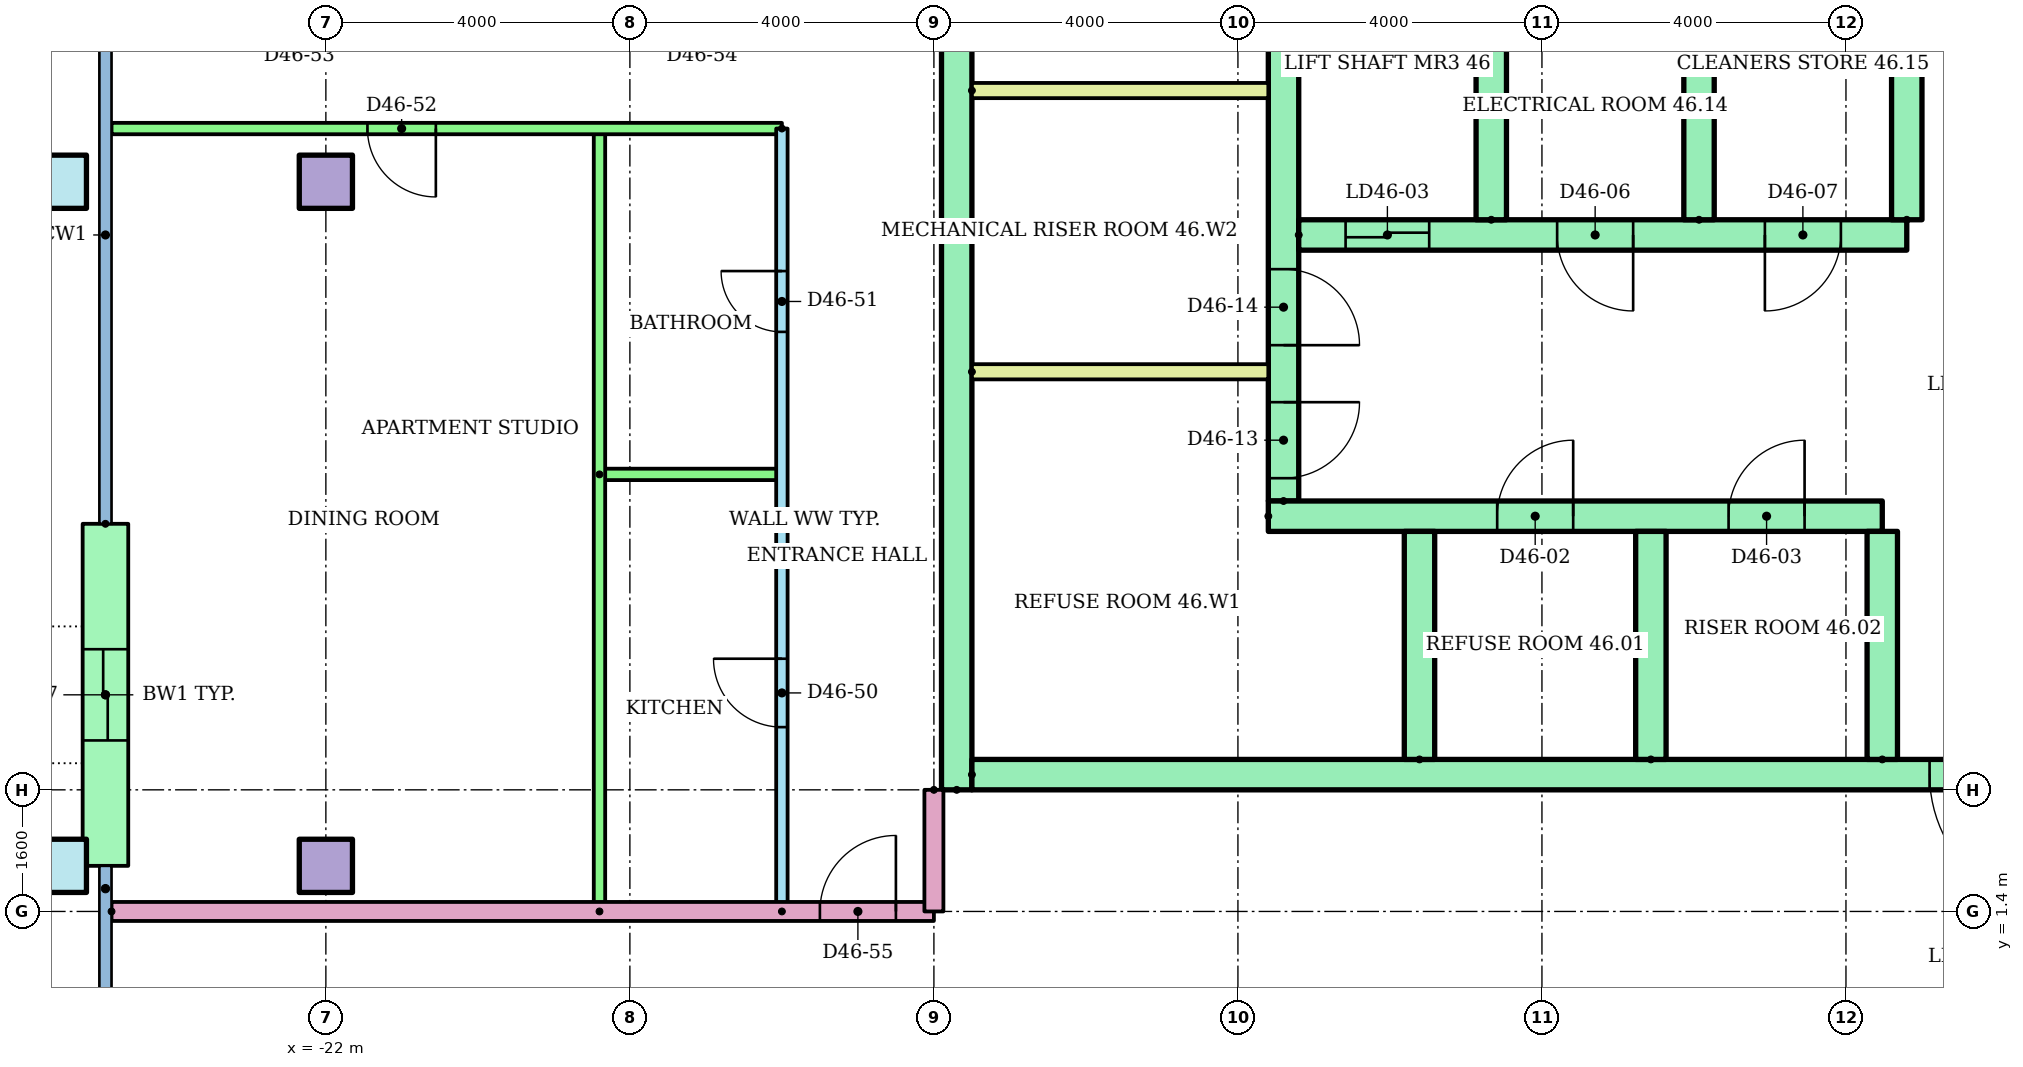
"""IFC4 building model, lengths in metres.
Left out: names, types, materials, properties, quantities, classifications, styles, units other than length and angle.
Written with IfcOpenShell. Run it as: python <this file> out.ifc"""

import sys

from ifc_helpers import new_model, si_unit, direction, frame, frame_2d, origin, origin_2d, place, context, subcontext, project, spatial, rectangle, hollow_rectangle, extrude, element, fill, save


model = new_model("IFC4")
c1 = context("Model", 3, precision=1e-05, world=origin(), true_north=direction((0.0, 1.0)))
c2 = subcontext(c1, "Body", "Model", "MODEL_VIEW")
j1 = project(units=[si_unit("LENGTHUNIT", "METRE"), si_unit("PLANEANGLEUNIT", "RADIAN")], contexts=[c1])
p1 = place(None, origin())
s1 = spatial("IfcSite", under=j1, at=p1, CompositionType="ELEMENT")
p2 = place(p1, origin())
s2 = spatial("IfcBuilding", under=s1, at=p2, CompositionType="ELEMENT")
p3 = place(p2, frame((0.0, 0.0, 178.1)))
s3 = spatial("IfcBuildingStorey", under=s2, at=p3, CompositionType="ELEMENT", Elevation=178.1)
p4 = place(p3, frame((-25.5, 2.0, 0.0)))
e1 = element("IfcColumn", 1, at=p4, inside=s3, PredefinedType="COLUMN", context=c2, shape_type="SweptSolid", body=[
    extrude(hollow_rectangle(XDim=0.7, YDim=0.7, WallThickness=0.036, at=origin_2d()), origin(), (0.0, 0.0, 1.0), 3.2),
])
p5 = place(p3, frame((-22.0, 2.0, 0.0)))
e2 = element("IfcColumn", 2, at=p5, inside=s3, PredefinedType="COLUMN", context=c2, shape_type="SweptSolid", body=[
    extrude(rectangle(XDim=0.7, YDim=0.7, at=origin_2d()), origin(), (0.0, 0.0, 1.0), 3.2),
])
p6 = place(p3, frame((-25.5, 11.0, 0.0)))
e3 = element("IfcColumn", 3, at=p6, inside=s3, PredefinedType="COLUMN", context=c2, shape_type="SweptSolid", body=[
    extrude(hollow_rectangle(XDim=0.7, YDim=0.7, WallThickness=0.036, at=origin_2d()), origin(), (0.0, 0.0, 1.0), 3.2),
])
p7 = place(p3, frame((-22.0, 11.0, 0.0)))
e4 = element("IfcColumn", 4, at=p7, inside=s3, PredefinedType="COLUMN", context=c2, shape_type="SweptSolid", body=[
    extrude(rectangle(XDim=0.7, YDim=0.7, at=origin_2d()), origin(), (0.0, 0.0, 1.0), 3.2),
])
p8 = place(p3, frame((-24.9, 6.5, 0.0), z_axis=(0.0, 0.0, 1.0), x_axis=(0.0, -1.0, 0.0)))
e5 = element("IfcWall", 5, at=p8, inside=s3, PredefinedType="STANDARD", context=c2, shape_type="SweptSolid", body=[
    extrude(rectangle(XDim=4.5, YDim=0.6, at=frame_2d((2.25, 0.0))), origin(), (0.0, 0.0, 1.0), 2.92),
])
p9 = place(p8, frame((1.65, 0.0, 0.0)))
e6 = element("IfcOpeningElement", 6, at=p9, cuts=e5, PredefinedType="OPENING", context=c2, shape_type="SweptSolid", body=[
    extrude(rectangle(XDim=1.2, YDim=2.1, at=frame_2d((0.6, 1.05))), frame((0.0, 0.31, 0.0), z_axis=(0.0, -1.0, 0.0), x_axis=(1.0, 0.0, 0.0)), (0.0, 0.0, 1.0), 0.62),
])
p10 = place(p3, frame((-13.7, 3.0, 0.0), z_axis=(0.0, 0.0, 1.0), x_axis=(0.0, 1.0, 0.0)))
e7 = element("IfcWall", 7, at=p10, inside=s3, PredefinedType="SHEAR", context=c2, shape_type="SweptSolid", body=[
    extrude(rectangle(XDim=17.0, YDim=0.4, at=frame_2d((8.5, 0.0))), origin(), (0.0, 0.0, 1.0), 2.92),
])
p11 = place(p3, frame((-9.4, 6.8, 0.0), z_axis=(0.0, 0.0, 1.0), x_axis=(0.0, 1.0, 0.0)))
e8 = element("IfcWall", 8, at=p11, inside=s3, PredefinedType="SHEAR", context=c2, shape_type="SweptSolid", body=[
    extrude(rectangle(XDim=12.7, YDim=0.4, at=frame_2d((6.35, 0.0))), origin(), (0.0, 0.0, 1.0), 2.92),
])
p12 = place(p11, frame((0.3, 0.0, 0.0)))
e9 = element("IfcOpeningElement", 9, at=p12, cuts=e8, PredefinedType="OPENING", context=c2, shape_type="SweptSolid", body=[
    extrude(rectangle(XDim=1.0, YDim=2.1, at=frame_2d((0.5, 1.05))), frame((0.0, 0.21, 0.0), z_axis=(0.0, -1.0, 0.0), x_axis=(1.0, 0.0, 0.0)), (0.0, 0.0, 1.0), 0.42),
])
p13 = place(p11, frame((2.05, 0.0, 0.0)))
e10 = element("IfcOpeningElement", 10, at=p13, cuts=e8, PredefinedType="OPENING", context=c2, shape_type="SweptSolid", body=[
    extrude(rectangle(XDim=1.0, YDim=2.1, at=frame_2d((0.5, 1.05))), frame((0.0, 0.21, 0.0), z_axis=(0.0, -1.0, 0.0), x_axis=(1.0, 0.0, 0.0)), (0.0, 0.0, 1.0), 0.42),
])
p14 = place(p11, frame((7.925, 0.0, 0.0)))
e11 = element("IfcOpeningElement", 11, at=p14, cuts=e8, PredefinedType="OPENING", context=c2, shape_type="SweptSolid", body=[
    extrude(rectangle(XDim=1.0, YDim=2.1, at=frame_2d((0.5, 1.05))), frame((0.0, 0.21, 0.0), z_axis=(0.0, -1.0, 0.0), x_axis=(1.0, 0.0, 0.0)), (0.0, 0.0, 1.0), 0.42),
])
p15 = place(p3, frame((-13.5, 3.2, 0.0)))
e12 = element("IfcWall", 12, at=p15, inside=s3, PredefinedType="SHEAR", context=c2, shape_type="SweptSolid", body=[
    extrude(rectangle(XDim=27.0, YDim=0.4, at=frame_2d((13.5, 0.0))), origin(), (0.0, 0.0, 1.0), 2.92),
])
p16 = place(p15, frame((22.083, 0.0, 0.0)))
e13 = element("IfcOpeningElement", 13, at=p16, cuts=e12, PredefinedType="OPENING", context=c2, shape_type="SweptSolid", body=[
    extrude(rectangle(XDim=1.1, YDim=2.1, at=frame_2d((0.55, 1.05))), frame((0.0, 0.21, 0.0), z_axis=(0.0, -1.0, 0.0), x_axis=(1.0, 0.0, 0.0)), (0.0, 0.0, 1.0), 0.42),
])
p17 = place(p15, frame((25.128, 0.0, 0.0)))
e14 = element("IfcOpeningElement", 14, at=p17, cuts=e12, PredefinedType="OPENING", context=c2, shape_type="SweptSolid", body=[
    extrude(rectangle(XDim=1.1, YDim=2.1, at=frame_2d((0.55, 1.05))), frame((0.0, 0.21, 0.0), z_axis=(0.0, -1.0, 0.0), x_axis=(1.0, 0.0, 0.0)), (0.0, 0.0, 1.0), 0.42),
])
p18 = place(p15, frame((12.6, 0.0, 0.0)))
e15 = element("IfcOpeningElement", 15, at=p18, cuts=e12, PredefinedType="OPENING", context=c2, shape_type="SweptSolid", body=[
    extrude(rectangle(XDim=1.8, YDim=2.1, at=frame_2d((0.9, 1.05))), frame((0.0, 0.21, 0.0), z_axis=(0.0, -1.0, 0.0), x_axis=(1.0, 0.0, 0.0)), (0.0, 0.0, 1.0), 0.42),
])
p19 = place(p3, frame((-9.6, 6.6, 0.0)))
e16 = element("IfcWall", 16, at=p19, inside=s3, PredefinedType="SHEAR", context=c2, shape_type="SweptSolid", body=[
    extrude(rectangle(XDim=8.078, YDim=0.4, at=frame_2d((4.039, 0.0))), origin(), (0.0, 0.0, 1.0), 2.92),
])
p20 = place(p19, frame((3.011, 0.0, 0.0)))
e17 = element("IfcOpeningElement", 17, at=p20, cuts=e16, PredefinedType="OPENING", context=c2, shape_type="SweptSolid", body=[
    extrude(rectangle(XDim=1.0, YDim=2.1, at=frame_2d((0.5, 1.05))), frame((0.0, 0.21, 0.0), z_axis=(0.0, -1.0, 0.0), x_axis=(1.0, 0.0, 0.0)), (0.0, 0.0, 1.0), 0.42),
])
p21 = place(p19, frame((6.056, 0.0, 0.0)))
e18 = element("IfcOpeningElement", 18, at=p21, cuts=e16, PredefinedType="OPENING", context=c2, shape_type="SweptSolid", body=[
    extrude(rectangle(XDim=1.0, YDim=2.1, at=frame_2d((0.5, 1.05))), frame((0.0, 0.21, 0.0), z_axis=(0.0, -1.0, 0.0), x_axis=(1.0, 0.0, 0.0)), (0.0, 0.0, 1.0), 0.42),
])
for number, where, z_axis, x_axis in (
    (19, (-7.611, 3.4, 0.0), (0.0, 0.0, 1.0), (0.0, 1.0, 0.0)),
    (20, (-4.567, 3.4, 0.0), (0.0, 0.0, 1.0), (0.0, 1.0, 0.0)),
    (21, (-1.522, 3.4, 0.0), (0.0, 0.0, 1.0), (0.0, 1.0, 0.0)),
):
    element("IfcWall", number, at=place(p3, frame(where, z_axis=z_axis, x_axis=x_axis)), inside=s3, PredefinedType="SHEAR", context=c2, shape_type="SweptSolid", body=[
        extrude(rectangle(XDim=3.0, YDim=0.4, at=frame_2d((1.5, 0.0))), origin(), (0.0, 0.0, 1.0), 2.92),
    ])
p22 = place(p3, frame((-9.2, 10.3, 0.0)))
e22 = element("IfcWall", 22, at=p22, inside=s3, PredefinedType="SHEAR", context=c2, shape_type="SweptSolid", body=[
    extrude(rectangle(XDim=8.0, YDim=0.4, at=frame_2d((4.0, 0.0))), origin(), (0.0, 0.0, 1.0), 2.92),
])
p23 = place(p22, frame((0.617, 0.0, 0.0)))
e23 = element("IfcOpeningElement", 23, at=p23, cuts=e22, PredefinedType="OPENING", context=c2, shape_type="SweptSolid", body=[
    extrude(rectangle(XDim=1.1, YDim=2.1, at=frame_2d((0.55, 1.05))), frame((0.0, 0.21, 0.0), z_axis=(0.0, -1.0, 0.0), x_axis=(1.0, 0.0, 0.0)), (0.0, 0.0, 1.0), 0.42),
])
p24 = place(p22, frame((3.4, 0.0, 0.0)))
e24 = element("IfcOpeningElement", 24, at=p24, cuts=e22, PredefinedType="OPENING", context=c2, shape_type="SweptSolid", body=[
    extrude(rectangle(XDim=1.0, YDim=2.1, at=frame_2d((0.5, 1.05))), frame((0.0, 0.21, 0.0), z_axis=(0.0, -1.0, 0.0), x_axis=(1.0, 0.0, 0.0)), (0.0, 0.0, 1.0), 0.42),
])
p25 = place(p22, frame((6.133, 0.0, 0.0)))
e25 = element("IfcOpeningElement", 25, at=p25, cuts=e22, PredefinedType="OPENING", context=c2, shape_type="SweptSolid", body=[
    extrude(rectangle(XDim=1.0, YDim=2.1, at=frame_2d((0.5, 1.05))), frame((0.0, 0.21, 0.0), z_axis=(0.0, -1.0, 0.0), x_axis=(1.0, 0.0, 0.0)), (0.0, 0.0, 1.0), 0.42),
])
for number, where, z_axis, x_axis in (
    (26, (-6.667, 10.5, 0.0), (0.0, 0.0, 1.0), (0.0, 1.0, 0.0)),
    (27, (-3.933, 10.5, 0.0), (0.0, 0.0, 1.0), (0.0, 1.0, 0.0)),
    (28, (-1.2, 10.5, 0.0), (0.0, 0.0, 1.0), (0.0, 1.0, 0.0)),
):
    element("IfcWall", number, at=place(p3, frame(where, z_axis=z_axis, x_axis=x_axis)), inside=s3, PredefinedType="SHEAR", context=c2, shape_type="SweptSolid", body=[
        extrude(rectangle(XDim=3.0, YDim=0.4, at=frame_2d((1.5, 0.0))), origin(), (0.0, 0.0, 1.0), 2.92),
    ])
for number, where in (
    (29, (-13.5, 8.5, 0.0)),
    (30, (-13.5, 12.2, 0.0)),
):
    element("IfcWall", number, at=place(p3, frame(where)), inside=s3, PredefinedType="PARTITIONING", context=c2, shape_type="SweptSolid", body=[
        extrude(rectangle(XDim=3.9, YDim=0.2, at=frame_2d((1.95, 0.0))), origin(), (0.0, 0.0, 1.0), 2.92),
    ])
p26 = place(p3, frame((-16.0, 1.4, 0.0), z_axis=(0.0, 0.0, 1.0), x_axis=(0.0, 1.0, 0.0)))
e31 = element("IfcWall", 31, at=p26, inside=s3, PredefinedType="PARTITIONING", context=c2, shape_type="SweptSolid", body=[
    extrude(rectangle(XDim=10.3, YDim=0.15, at=frame_2d((5.15, 0.0))), origin(), (0.0, 0.0, 1.0), 2.4),
])
p27 = place(p26, frame((2.425, 0.0, 0.0)))
e32 = element("IfcOpeningElement", 32, at=p27, cuts=e31, PredefinedType="OPENING", context=c2, shape_type="SweptSolid", body=[
    extrude(rectangle(XDim=0.9, YDim=2.1, at=frame_2d((0.45, 1.05))), frame((0.0, 0.085, 0.0), z_axis=(0.0, -1.0, 0.0), x_axis=(1.0, 0.0, 0.0)), (0.0, 0.0, 1.0), 0.17),
])
p28 = place(p26, frame((7.625, 0.0, 0.0)))
e33 = element("IfcOpeningElement", 33, at=p28, cuts=e31, PredefinedType="OPENING", context=c2, shape_type="SweptSolid", body=[
    extrude(rectangle(XDim=0.8, YDim=2.1, at=frame_2d((0.4, 1.05))), frame((0.0, 0.085, 0.0), z_axis=(0.0, -1.0, 0.0), x_axis=(1.0, 0.0, 0.0)), (0.0, 0.0, 1.0), 0.17),
])
p29 = place(p3, frame((-18.4, 7.15, 0.0)))
e34 = element("IfcWall", 34, at=p29, inside=s3, PredefinedType="PARTITIONING", context=c2, shape_type="SweptSolid", body=[
    extrude(rectangle(XDim=2.4, YDim=0.15, at=frame_2d((1.2, 0.0))), origin(), (0.0, 0.0, 1.0), 2.4),
])
p30 = place(p3, frame((-18.4, 1.4, 0.0), z_axis=(0.0, 0.0, 1.0), x_axis=(0.0, 1.0, 0.0)))
e35 = element("IfcWall", 35, at=p30, inside=s3, PredefinedType="PARTITIONING", context=c2, shape_type="SweptSolid", body=[
    extrude(rectangle(XDim=10.3, YDim=0.15, at=frame_2d((5.15, 0.0))), origin(), (0.0, 0.0, 1.0), 2.4),
])
p31 = place(p3, frame((-16.0, 11.7, 0.0), z_axis=(0.0, 0.0, 1.0), x_axis=(-1.0, 0.0, 0.0)))
e36 = element("IfcWall", 36, at=p31, inside=s3, PredefinedType="PARTITIONING", context=c2, shape_type="SweptSolid", body=[
    extrude(rectangle(XDim=8.82, YDim=0.15, at=frame_2d((4.41, 0.0))), origin(), (0.0, 0.0, 1.0), 2.4),
])
p32 = place(p31, frame((4.553, 0.0, 0.0)))
e37 = element("IfcOpeningElement", 37, at=p32, cuts=e36, PredefinedType="OPENING", context=c2, shape_type="SweptSolid", body=[
    extrude(rectangle(XDim=0.9, YDim=2.1, at=frame_2d((0.45, 1.05))), frame((0.0, 0.085, 0.0), z_axis=(0.0, -1.0, 0.0), x_axis=(1.0, 0.0, 0.0)), (0.0, 0.0, 1.0), 0.17),
])
p33 = place(p3, frame((-24.82, 1.4, 0.0)))
e38 = element("IfcWall", 38, at=p33, inside=s3, PredefinedType="PARTITIONING", context=c2, shape_type="SweptSolid", body=[
    extrude(rectangle(XDim=10.82, YDim=0.25, at=frame_2d((5.41, 0.0))), origin(), (0.0, 0.0, 1.0), 2.4),
])
p34 = place(p33, frame((9.32, 0.0, 0.0)))
e39 = element("IfcOpeningElement", 39, at=p34, cuts=e38, PredefinedType="OPENING", context=c2, shape_type="SweptSolid", body=[
    extrude(rectangle(XDim=1.0, YDim=2.1, at=frame_2d((0.5, 1.05))), frame((0.0, 0.135, 0.0), z_axis=(0.0, -1.0, 0.0), x_axis=(1.0, 0.0, 0.0)), (0.0, 0.0, 1.0), 0.27),
])
p35 = place(p3, frame((-14.0, 3.0, 0.0), z_axis=(0.0, 0.0, 1.0), x_axis=(0.0, -1.0, 0.0)))
e40 = element("IfcWall", 40, at=p35, inside=s3, PredefinedType="PARTITIONING", context=c2, shape_type="SweptSolid", body=[
    extrude(rectangle(XDim=1.6, YDim=0.25, at=frame_2d((0.8, 0.0))), origin(), (0.0, 0.0, 1.0), 2.4),
])
p36 = place(p18, frame((1.8, 0.0, 0.0), z_axis=(0.0, 0.0, 1.0), x_axis=(-1.0, 0.0, 0.0)))
e41 = element("IfcDoor", 41, at=p36, inside=s3, OperationType="DOUBLE_DOOR_SINGLE_SWING", PredefinedType="DOOR", context=c2, shape_type="SweptSolid", body=[
    extrude(rectangle(XDim=1.8, YDim=2.1, at=frame_2d((0.9, 1.05))), frame((0.0, 0.025, 0.0), z_axis=(0.0, -1.0, 0.0), x_axis=(1.0, 0.0, 0.0)), (0.0, 0.0, 1.0), 0.05),
])
fill(e15, e41)
p37 = place(p20, origin())
e42 = element("IfcDoor", 42, at=p37, inside=s3, OperationType="SINGLE_SWING_RIGHT", PredefinedType="DOOR", context=c2, shape_type="SweptSolid", body=[
    extrude(rectangle(XDim=1.0, YDim=2.1, at=frame_2d((0.5, 1.05))), frame((0.0, 0.025, 0.0), z_axis=(0.0, -1.0, 0.0), x_axis=(1.0, 0.0, 0.0)), (0.0, 0.0, 1.0), 0.05),
])
fill(e17, e42)
p38 = place(p21, origin())
e43 = element("IfcDoor", 43, at=p38, inside=s3, OperationType="SINGLE_SWING_RIGHT", PredefinedType="DOOR", context=c2, shape_type="SweptSolid", body=[
    extrude(rectangle(XDim=1.0, YDim=2.1, at=frame_2d((0.5, 1.05))), frame((0.0, 0.025, 0.0), z_axis=(0.0, -1.0, 0.0), x_axis=(1.0, 0.0, 0.0)), (0.0, 0.0, 1.0), 0.05),
])
fill(e18, e43)
p39 = place(p23, origin())
e44 = element("IfcDoor", 44, at=p39, inside=s3, OperationType="SLIDING_TO_LEFT", PredefinedType="DOOR", context=c2, shape_type="SweptSolid", body=[
    extrude(rectangle(XDim=1.1, YDim=2.1, at=frame_2d((0.55, 1.05))), frame((0.0, 0.025, 0.0), z_axis=(0.0, -1.0, 0.0), x_axis=(1.0, 0.0, 0.0)), (0.0, 0.0, 1.0), 0.05),
])
fill(e23, e44)
p40 = place(p24, frame((1.0, 0.0, 0.0), z_axis=(0.0, 0.0, 1.0), x_axis=(-1.0, 0.0, 0.0)))
e45 = element("IfcDoor", 45, at=p40, inside=s3, OperationType="SINGLE_SWING_RIGHT", PredefinedType="DOOR", context=c2, shape_type="SweptSolid", body=[
    extrude(rectangle(XDim=1.0, YDim=2.1, at=frame_2d((0.5, 1.05))), frame((0.0, 0.025, 0.0), z_axis=(0.0, -1.0, 0.0), x_axis=(1.0, 0.0, 0.0)), (0.0, 0.0, 1.0), 0.05),
])
fill(e24, e45)
p41 = place(p25, frame((1.0, 0.0, 0.0), z_axis=(0.0, 0.0, 1.0), x_axis=(-1.0, 0.0, 0.0)))
e46 = element("IfcDoor", 46, at=p41, inside=s3, OperationType="SINGLE_SWING_LEFT", PredefinedType="DOOR", context=c2, shape_type="SweptSolid", body=[
    extrude(rectangle(XDim=1.0, YDim=2.1, at=frame_2d((0.5, 1.05))), frame((0.0, 0.025, 0.0), z_axis=(0.0, -1.0, 0.0), x_axis=(1.0, 0.0, 0.0)), (0.0, 0.0, 1.0), 0.05),
])
fill(e25, e46)
p42 = place(p12, frame((1.0, 0.0, 0.0), z_axis=(0.0, 0.0, 1.0), x_axis=(-1.0, 0.0, 0.0)))
e47 = element("IfcDoor", 47, at=p42, inside=s3, OperationType="SINGLE_SWING_RIGHT", PredefinedType="DOOR", context=c2, shape_type="SweptSolid", body=[
    extrude(rectangle(XDim=1.0, YDim=2.1, at=frame_2d((0.5, 1.05))), frame((0.0, 0.025, 0.0), z_axis=(0.0, -1.0, 0.0), x_axis=(1.0, 0.0, 0.0)), (0.0, 0.0, 1.0), 0.05),
])
fill(e9, e47)
p43 = place(p13, frame((1.0, 0.0, 0.0), z_axis=(0.0, 0.0, 1.0), x_axis=(-1.0, 0.0, 0.0)))
e48 = element("IfcDoor", 48, at=p43, inside=s3, OperationType="SINGLE_SWING_LEFT", PredefinedType="DOOR", context=c2, shape_type="SweptSolid", body=[
    extrude(rectangle(XDim=1.0, YDim=2.1, at=frame_2d((0.5, 1.05))), frame((0.0, 0.025, 0.0), z_axis=(0.0, -1.0, 0.0), x_axis=(1.0, 0.0, 0.0)), (0.0, 0.0, 1.0), 0.05),
])
fill(e10, e48)
p44 = place(p27, origin())
e49 = element("IfcDoor", 49, at=p44, inside=s3, OperationType="SINGLE_SWING_RIGHT", PredefinedType="DOOR", context=c2, shape_type="SweptSolid", body=[
    extrude(rectangle(XDim=0.9, YDim=2.1, at=frame_2d((0.45, 1.05))), frame((0.0, 0.025, 0.0), z_axis=(0.0, -1.0, 0.0), x_axis=(1.0, 0.0, 0.0)), (0.0, 0.0, 1.0), 0.05),
])
fill(e32, e49)
p45 = place(p28, origin())
e50 = element("IfcDoor", 50, at=p45, inside=s3, OperationType="SINGLE_SWING_RIGHT", PredefinedType="DOOR", context=c2, shape_type="SweptSolid", body=[
    extrude(rectangle(XDim=0.8, YDim=2.1, at=frame_2d((0.4, 1.05))), frame((0.0, 0.025, 0.0), z_axis=(0.0, -1.0, 0.0), x_axis=(1.0, 0.0, 0.0)), (0.0, 0.0, 1.0), 0.05),
])
fill(e33, e50)
p46 = place(p32, origin())
e51 = element("IfcDoor", 51, at=p46, inside=s3, OperationType="SINGLE_SWING_LEFT", PredefinedType="DOOR", context=c2, shape_type="SweptSolid", body=[
    extrude(rectangle(XDim=0.9, YDim=2.1, at=frame_2d((0.45, 1.05))), frame((0.0, 0.025, 0.0), z_axis=(0.0, -1.0, 0.0), x_axis=(1.0, 0.0, 0.0)), (0.0, 0.0, 1.0), 0.05),
])
fill(e37, e51)
p47 = place(p34, origin())
e52 = element("IfcDoor", 52, at=p47, inside=s3, OperationType="SINGLE_SWING_RIGHT", PredefinedType="DOOR", context=c2, shape_type="SweptSolid", body=[
    extrude(rectangle(XDim=1.0, YDim=2.1, at=frame_2d((0.5, 1.05))), frame((0.0, 0.025, 0.0), z_axis=(0.0, -1.0, 0.0), x_axis=(1.0, 0.0, 0.0)), (0.0, 0.0, 1.0), 0.05),
])
fill(e39, e52)
p48 = place(p9, origin())
e53 = element("IfcDoor", 53, at=p48, inside=s3, OperationType="SLIDING_TO_LEFT", PredefinedType="DOOR", context=c2, shape_type="SweptSolid", body=[
    extrude(rectangle(XDim=1.2, YDim=2.1, at=frame_2d((0.6, 1.05))), frame((0.0, 0.025, 0.0), z_axis=(0.0, -1.0, 0.0), x_axis=(1.0, 0.0, 0.0)), (0.0, 0.0, 1.0), 0.05),
])
fill(e6, e53)
save(model, sys.argv[1])
